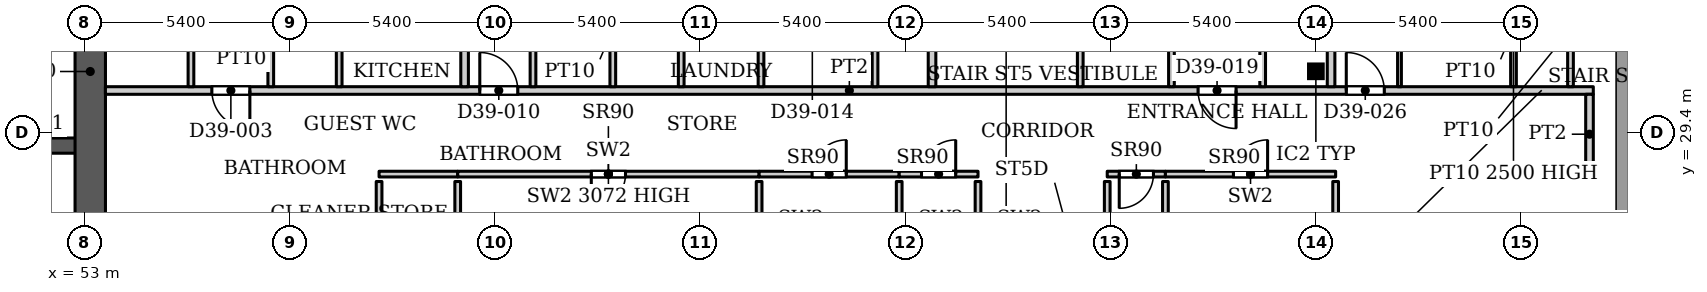
"""IFC4 building model, lengths in metres.
Left out: names, types, materials, properties, quantities, classifications, styles, units other than length and angle.
Written with IfcOpenShell. Run it as: python <this file> out.ifc"""

import sys

from ifc_helpers import new_model, si_unit, direction, frame, frame_2d, origin, origin_2d, place, context, subcontext, project, spatial, rectangle, hollow_rectangle, extrude, source, transform, mapped, element, fill, save


model = new_model("IFC4")
c1 = context("Model", 3, precision=1e-05, world=origin(), true_north=direction((0.0, 1.0)))
c2 = subcontext(c1, "Body", "Model", "MODEL_VIEW")
j1 = project(units=[si_unit("LENGTHUNIT", "METRE"), si_unit("PLANEANGLEUNIT", "RADIAN")], contexts=[c1])
p1 = place(None, origin())
s1 = spatial("IfcSite", under=j1, at=p1, CompositionType="ELEMENT")
p2 = place(p1, origin())
s2 = spatial("IfcBuilding", under=s1, at=p2, CompositionType="ELEMENT")
p3 = place(p2, frame((0.0, 0.0, 168.2)))
s3 = spatial("IfcBuildingStorey", under=s2, at=p3, CompositionType="ELEMENT", Elevation=168.2)
p4 = place(p3, frame((85.4, 31.005, 0.0), z_axis=(0.0, 0.0, 1.0), x_axis=(1.0, 0.0, 0.0)))
e1 = element("IfcColumn", 1, at=p4, inside=s3, PredefinedType="COLUMN", context=c2, shape_type="SweptSolid", body=[
    extrude(hollow_rectangle(XDim=0.305, YDim=0.305, WallThickness=0.016, InnerFilletRadius=0.016, OuterFilletRadius=0.032, at=origin_2d()), origin(), (0.0, 0.0, 1.0), 3.9),
])
p5 = place(p3, frame((34.75, 29.05, 0.0), z_axis=(0.0, 0.0, 1.0), x_axis=(1.0, 0.0, 0.0)))
e2 = element("IfcWall", 2, at=p5, inside=s3, PredefinedType="SHEAR", context=c2, shape_type="SweptSolid", body=[
    extrude(rectangle(XDim=18.4, YDim=0.4, at=frame_2d((9.2, 0.0))), origin(), (0.0, 0.0, 1.0), 3.9),
])
p6 = place(p5, frame((0.875, 0.0, 0.0)))
e3 = element("IfcOpeningElement", 3, at=p6, cuts=e2, PredefinedType="OPENING", context=c2, shape_type="SweptSolid", body=[
    extrude(rectangle(XDim=1.1, YDim=2.2, at=frame_2d((0.55, 1.1))), frame((0.0, 0.21, 0.0), z_axis=(0.0, -1.0, 0.0), x_axis=(1.0, 0.0, 0.0)), (0.0, 0.0, 1.0), 0.42),
])
p7 = place(p5, frame((3.725, 0.0, 0.0)))
e4 = element("IfcOpeningElement", 4, at=p7, cuts=e2, PredefinedType="OPENING", context=c2, shape_type="SweptSolid", body=[
    extrude(rectangle(XDim=1.1, YDim=2.2, at=frame_2d((0.55, 1.1))), frame((0.0, 0.21, 0.0), z_axis=(0.0, -1.0, 0.0), x_axis=(1.0, 0.0, 0.0)), (0.0, 0.0, 1.0), 0.42),
])
p8 = place(p5, frame((6.575, 0.0, 0.0)))
e5 = element("IfcOpeningElement", 5, at=p8, cuts=e2, PredefinedType="OPENING", context=c2, shape_type="SweptSolid", body=[
    extrude(rectangle(XDim=1.1, YDim=2.2, at=frame_2d((0.55, 1.1))), frame((0.0, 0.21, 0.0), z_axis=(0.0, -1.0, 0.0), x_axis=(1.0, 0.0, 0.0)), (0.0, 0.0, 1.0), 0.42),
])
p9 = place(p5, frame((9.425, 0.0, 0.0)))
e6 = element("IfcOpeningElement", 6, at=p9, cuts=e2, PredefinedType="OPENING", context=c2, shape_type="SweptSolid", body=[
    extrude(rectangle(XDim=1.1, YDim=2.2, at=frame_2d((0.55, 1.1))), frame((0.0, 0.21, 0.0), z_axis=(0.0, -1.0, 0.0), x_axis=(1.0, 0.0, 0.0)), (0.0, 0.0, 1.0), 0.42),
])
p10 = place(p5, frame((12.275, 0.0, 0.0)))
e7 = element("IfcOpeningElement", 7, at=p10, cuts=e2, PredefinedType="OPENING", context=c2, shape_type="SweptSolid", body=[
    extrude(rectangle(XDim=1.1, YDim=2.2, at=frame_2d((0.55, 1.1))), frame((0.0, 0.21, 0.0), z_axis=(0.0, -1.0, 0.0), x_axis=(1.0, 0.0, 0.0)), (0.0, 0.0, 1.0), 0.42),
])
p11 = place(p5, frame((15.125, 0.0, 0.0)))
e8 = element("IfcOpeningElement", 8, at=p11, cuts=e2, PredefinedType="OPENING", context=c2, shape_type="SweptSolid", body=[
    extrude(rectangle(XDim=1.1, YDim=2.2, at=frame_2d((0.55, 1.1))), frame((0.0, 0.21, 0.0), z_axis=(0.0, -1.0, 0.0), x_axis=(1.0, 0.0, 0.0)), (0.0, 0.0, 1.0), 0.42),
])
p12 = place(p3, frame((53.15, 25.8, 0.0), z_axis=(0.0, 0.0, 1.0), x_axis=(0.0, 1.0, 0.0)))
e9 = element("IfcWall", 9, at=p12, inside=s3, PredefinedType="SHEAR", context=c2, shape_type="SweptSolid", body=[
    extrude(rectangle(XDim=10.4, YDim=0.8, at=frame_2d((5.2, 0.0))), origin(), (0.0, 0.0, 1.0), 3.9),
])
p13 = place(p3, frame((60.75, 28.3, 0.0), z_axis=(0.0, 0.0, 1.0), x_axis=(1.0, 0.0, 0.0)))
e10 = element("IfcWall", 10, at=p13, inside=s3, PredefinedType="PARTITIONING", context=c2, shape_type="SweptSolid", body=[
    extrude(rectangle(XDim=2.069, YDim=0.15, at=frame_2d((1.035, 0.0))), origin(), (0.0, 0.0, 1.0), 3.9),
])
p14 = place(p3, frame((60.75, 23.075, 0.0), z_axis=(0.0, 0.0, 1.0), x_axis=(0.0, 1.0, 0.0)))
e11 = element("IfcWall", 11, at=p14, inside=s3, PredefinedType="PARTITIONING", context=c2, shape_type="SweptSolid", body=[
    extrude(rectangle(XDim=5.03, YDim=0.15, at=frame_2d((2.515, 0.0))), origin(), (0.0, 0.0, 1.0), 3.9),
])
p15 = place(p14, frame((2.387, 0.0, 0.0)))
e12 = element("IfcOpeningElement", 12, at=p15, cuts=e11, PredefinedType="OPENING", context=c2, shape_type="SweptSolid", body=[
    extrude(rectangle(XDim=0.9, YDim=2.2, at=frame_2d((0.45, 1.1))), frame((0.0, 0.085, 0.0), z_axis=(0.0, -1.0, 0.0), x_axis=(1.0, 0.0, 0.0)), (0.0, 0.0, 1.0), 0.17),
])
p16 = place(p3, frame((62.819, 22.966, 0.0), z_axis=(0.0, 0.0, 1.0), x_axis=(0.0, 1.0, 0.0)))
e13 = element("IfcWall", 13, at=p16, inside=s3, PredefinedType="PARTITIONING", context=c2, shape_type="SweptSolid", body=[
    extrude(rectangle(XDim=5.139, YDim=0.15, at=frame_2d((2.569, 0.0))), origin(), (0.0, 0.0, 1.0), 3.9),
])
p17 = place(p3, frame((62.819, 28.3, 0.0), z_axis=(0.0, 0.0, 1.0), x_axis=(1.0, 0.0, 0.0)))
e14 = element("IfcWall", 14, at=p17, inside=s3, PredefinedType="PARTITIONING", context=c2, shape_type="SweptSolid", body=[
    extrude(rectangle(XDim=7.931, YDim=0.15, at=frame_2d((3.965, 0.0))), origin(), (0.0, 0.0, 1.0), 3.072),
])
p18 = place(p17, frame((3.515, 0.0, 0.0)))
e15 = element("IfcOpeningElement", 15, at=p18, cuts=e14, PredefinedType="OPENING", context=c2, shape_type="SweptSolid", body=[
    extrude(rectangle(XDim=0.9, YDim=2.2, at=frame_2d((0.45, 1.1))), frame((0.0, 0.085, 0.0), z_axis=(0.0, -1.0, 0.0), x_axis=(1.0, 0.0, 0.0)), (0.0, 0.0, 1.0), 0.17),
])
p19 = place(p3, frame((70.75, 26.12, 0.0), z_axis=(0.0, 0.0, 1.0), x_axis=(0.0, 1.0, 0.0)))
e16 = element("IfcWall", 16, at=p19, inside=s3, PredefinedType="PARTITIONING", context=c2, shape_type="SweptSolid", body=[
    extrude(rectangle(XDim=1.985, YDim=0.15, at=frame_2d((0.992, 0.0))), origin(), (0.0, 0.0, 1.0), 3.9),
])
p20 = place(p3, frame((70.75, 28.3, 0.0), z_axis=(0.0, 0.0, 1.0), x_axis=(1.0, 0.0, 0.0)))
e17 = element("IfcWall", 17, at=p20, inside=s3, PredefinedType="PARTITIONING", context=c2, shape_type="SweptSolid", body=[
    extrude(rectangle(XDim=3.686, YDim=0.15, at=frame_2d((1.843, 0.0))), origin(), (0.0, 0.0, 1.0), 3.9),
])
p21 = place(p20, frame((1.393, 0.0, 0.0)))
e18 = element("IfcOpeningElement", 18, at=p21, cuts=e17, PredefinedType="OPENING", context=c2, shape_type="SweptSolid", body=[
    extrude(rectangle(XDim=0.9, YDim=2.2, at=frame_2d((0.45, 1.1))), frame((0.0, 0.085, 0.0), z_axis=(0.0, -1.0, 0.0), x_axis=(1.0, 0.0, 0.0)), (0.0, 0.0, 1.0), 0.17),
])
p22 = place(p3, frame((74.436, 26.12, 0.0), z_axis=(0.0, 0.0, 1.0), x_axis=(0.0, 1.0, 0.0)))
e19 = element("IfcWall", 19, at=p22, inside=s3, PredefinedType="PARTITIONING", context=c2, shape_type="SweptSolid", body=[
    extrude(rectangle(XDim=1.985, YDim=0.15, at=frame_2d((0.992, 0.0))), origin(), (0.0, 0.0, 1.0), 3.9),
])
p23 = place(p3, frame((74.436, 28.3, 0.0), z_axis=(0.0, 0.0, 1.0), x_axis=(1.0, 0.0, 0.0)))
e20 = element("IfcWall", 20, at=p23, inside=s3, PredefinedType="PARTITIONING", context=c2, shape_type="SweptSolid", body=[
    extrude(rectangle(XDim=2.074, YDim=0.15, at=frame_2d((1.037, 0.0))), origin(), (0.0, 0.0, 1.0), 3.9),
])
p24 = place(p23, frame((0.587, 0.0, 0.0)))
e21 = element("IfcOpeningElement", 21, at=p24, cuts=e20, PredefinedType="OPENING", context=c2, shape_type="SweptSolid", body=[
    extrude(rectangle(XDim=0.9, YDim=2.2, at=frame_2d((0.45, 1.1))), frame((0.0, 0.085, 0.0), z_axis=(0.0, -1.0, 0.0), x_axis=(1.0, 0.0, 0.0)), (0.0, 0.0, 1.0), 0.17),
])
p25 = place(p3, frame((76.51, 26.12, 0.0), z_axis=(0.0, 0.0, 1.0), x_axis=(0.0, 1.0, 0.0)))
e22 = element("IfcWall", 22, at=p25, inside=s3, PredefinedType="PARTITIONING", context=c2, shape_type="SweptSolid", body=[
    extrude(rectangle(XDim=1.985, YDim=0.15, at=frame_2d((0.992, 0.0))), origin(), (0.0, 0.0, 1.0), 3.9),
])
p26 = place(p3, frame((79.91, 28.3, 0.0), z_axis=(0.0, 0.0, 1.0), x_axis=(1.0, 0.0, 0.0)))
e23 = element("IfcWall", 23, at=p26, inside=s3, PredefinedType="PARTITIONING", context=c2, shape_type="SweptSolid", body=[
    extrude(rectangle(XDim=1.531, YDim=0.15, at=frame_2d((0.766, 0.0))), origin(), (0.0, 0.0, 1.0), 3.9),
])
p27 = place(p26, frame((0.316, 0.0, 0.0)))
e24 = element("IfcOpeningElement", 24, at=p27, cuts=e23, PredefinedType="OPENING", context=c2, shape_type="SweptSolid", body=[
    extrude(rectangle(XDim=0.9, YDim=2.2, at=frame_2d((0.45, 1.1))), frame((0.0, 0.085, 0.0), z_axis=(0.0, -1.0, 0.0), x_axis=(1.0, 0.0, 0.0)), (0.0, 0.0, 1.0), 0.17),
])
p28 = place(p3, frame((79.91, 26.12, 0.0), z_axis=(0.0, 0.0, 1.0), x_axis=(0.0, 1.0, 0.0)))
e25 = element("IfcWall", 25, at=p28, inside=s3, PredefinedType="PARTITIONING", context=c2, shape_type="SweptSolid", body=[
    extrude(rectangle(XDim=1.985, YDim=0.15, at=frame_2d((0.992, 0.0))), origin(), (0.0, 0.0, 1.0), 3.9),
])
p29 = place(p3, frame((81.441, 25.62, 0.0), z_axis=(0.0, 0.0, 1.0), x_axis=(0.0, 1.0, 0.0)))
e26 = element("IfcWall", 26, at=p29, inside=s3, PredefinedType="PARTITIONING", context=c2, shape_type="SweptSolid", body=[
    extrude(rectangle(XDim=2.485, YDim=0.15, at=frame_2d((1.242, 0.0))), origin(), (0.0, 0.0, 1.0), 3.9),
])
p30 = place(p3, frame((81.441, 28.3, 0.0), z_axis=(0.0, 0.0, 1.0), x_axis=(1.0, 0.0, 0.0)))
e27 = element("IfcWall", 27, at=p30, inside=s3, PredefinedType="PARTITIONING", context=c2, shape_type="SweptSolid", body=[
    extrude(rectangle(XDim=4.479, YDim=0.15, at=frame_2d((2.24, 0.0))), origin(), (0.0, 0.0, 1.0), 3.9),
])
p31 = place(p30, frame((1.789, 0.0, 0.0)))
e28 = element("IfcOpeningElement", 28, at=p31, cuts=e27, PredefinedType="OPENING", context=c2, shape_type="SweptSolid", body=[
    extrude(rectangle(XDim=0.9, YDim=2.2, at=frame_2d((0.45, 1.1))), frame((0.0, 0.085, 0.0), z_axis=(0.0, -1.0, 0.0), x_axis=(1.0, 0.0, 0.0)), (0.0, 0.0, 1.0), 0.17),
])
p32 = place(p3, frame((85.92, 25.62, 0.0), z_axis=(0.0, 0.0, 1.0), x_axis=(0.0, 1.0, 0.0)))
e29 = element("IfcWall", 29, at=p32, inside=s3, PredefinedType="PARTITIONING", context=c2, shape_type="SweptSolid", body=[
    extrude(rectangle(XDim=2.485, YDim=0.15, at=frame_2d((1.242, 0.0))), origin(), (0.0, 0.0, 1.0), 3.9),
])
p33 = place(p3, frame((53.549, 30.5, 0.0), z_axis=(0.0, 0.0, 1.0), x_axis=(1.0, 0.0, 0.0)))
e30 = element("IfcWall", 30, at=p33, inside=s3, PredefinedType="PARTITIONING", context=c2, shape_type="SweptSolid", body=[
    extrude(rectangle(XDim=39.151, YDim=0.2, at=frame_2d((19.575, 0.0))), origin(), (0.0, 0.0, 1.0), 3.6),
])
p34 = place(p33, frame((2.801, 0.0, 0.0)))
e31 = element("IfcOpeningElement", 31, at=p34, cuts=e30, PredefinedType="OPENING", context=c2, shape_type="SweptSolid", body=[
    extrude(rectangle(XDim=1.0, YDim=2.1, at=frame_2d((0.5, 1.05))), frame((0.0, 0.11, 0.0), z_axis=(0.0, -1.0, 0.0), x_axis=(1.0, 0.0, 0.0)), (0.0, 0.0, 1.0), 0.22),
])
p35 = place(p33, frame((9.851, 0.0, 0.0)))
e32 = element("IfcOpeningElement", 32, at=p35, cuts=e30, PredefinedType="OPENING", context=c2, shape_type="SweptSolid", body=[
    extrude(rectangle(XDim=1.0, YDim=2.1, at=frame_2d((0.5, 1.05))), frame((0.0, 0.11, 0.0), z_axis=(0.0, -1.0, 0.0), x_axis=(1.0, 0.0, 0.0)), (0.0, 0.0, 1.0), 0.22),
])
p36 = place(p33, frame((28.751, 0.0, 0.0)))
e33 = element("IfcOpeningElement", 33, at=p36, cuts=e30, PredefinedType="OPENING", context=c2, shape_type="SweptSolid", body=[
    extrude(rectangle(XDim=1.0, YDim=2.1, at=frame_2d((0.5, 1.05))), frame((0.0, 0.11, 0.0), z_axis=(0.0, -1.0, 0.0), x_axis=(1.0, 0.0, 0.0)), (0.0, 0.0, 1.0), 0.22),
])
p37 = place(p33, frame((32.651, 0.0, 0.0)))
e34 = element("IfcOpeningElement", 34, at=p37, cuts=e30, PredefinedType="OPENING", context=c2, shape_type="SweptSolid", body=[
    extrude(rectangle(XDim=1.0, YDim=2.1, at=frame_2d((0.5, 1.05))), frame((0.0, 0.11, 0.0), z_axis=(0.0, -1.0, 0.0), x_axis=(1.0, 0.0, 0.0)), (0.0, 0.0, 1.0), 0.22),
])
p38 = place(p3, frame((55.8, 30.6, 0.0), z_axis=(0.0, 0.0, 1.0), x_axis=(0.0, 1.0, 0.0)))
e35 = element("IfcWall", 35, at=p38, inside=s3, PredefinedType="PARTITIONING", context=c2, shape_type="SweptSolid", body=[
    extrude(rectangle(XDim=3.175, YDim=0.15, at=frame_2d((1.587, 0.0))), origin(), (0.0, 0.0, 1.0), 3.6),
])
for number, where, z_axis, x_axis in (
    (36, (57.9, 30.6, 0.0), (0.0, 0.0, 1.0), (0.0, 1.0, 0.0)),
    (37, (59.7, 30.6, 0.0), (0.0, 0.0, 1.0), (0.0, 1.0, 0.0)),
):
    element("IfcWall", number, at=place(p3, frame(where, z_axis=z_axis, x_axis=x_axis)), inside=s3, PredefinedType="PARTITIONING", context=c2, shape_type="SweptSolid", body=[
        extrude(rectangle(XDim=3.025, YDim=0.15, at=frame_2d((1.512, 0.0))), origin(), (0.0, 0.0, 1.0), 3.6),
    ])
p39 = place(p3, frame((63.0, 30.6, 0.0), z_axis=(0.0, 0.0, 1.0), x_axis=(0.0, 1.0, 0.0)))
e38 = element("IfcWall", 38, at=p39, inside=s3, PredefinedType="PARTITIONING", context=c2, shape_type="SweptSolid", body=[
    extrude(rectangle(XDim=13.3, YDim=0.2, at=frame_2d((6.65, 0.0))), origin(), (0.0, 0.0, 1.0), 3.6),
])
for number, where, z_axis, x_axis in (
    (39, (64.8, 30.6, 0.0), (0.0, 0.0, 1.0), (0.0, 1.0, 0.0)),
    (40, (66.9, 30.6, 0.0), (0.0, 0.0, 1.0), (0.0, 1.0, 0.0)),
    (41, (68.7, 30.6, 0.0), (0.0, 0.0, 1.0), (0.0, 1.0, 0.0)),
    (42, (70.8, 30.6, 0.0), (0.0, 0.0, 1.0), (0.0, 1.0, 0.0)),
    (43, (73.8, 30.6, 0.0), (0.0, 0.0, 1.0), (0.0, 1.0, 0.0)),
):
    element("IfcWall", number, at=place(p3, frame(where, z_axis=z_axis, x_axis=x_axis)), inside=s3, PredefinedType="PARTITIONING", context=c2, shape_type="SweptSolid", body=[
        extrude(rectangle(XDim=3.025, YDim=0.15, at=frame_2d((1.512, 0.0))), origin(), (0.0, 0.0, 1.0), 3.6),
    ])
p40 = place(p3, frame((75.3, 30.6, 0.0), z_axis=(0.0, 0.0, 1.0), x_axis=(0.0, 1.0, 0.0)))
e44 = element("IfcWall", 44, at=p40, inside=s3, PredefinedType="PARTITIONING", context=c2, shape_type="SweptSolid", body=[
    extrude(rectangle(XDim=13.3, YDim=0.2, at=frame_2d((6.65, 0.0))), origin(), (0.0, 0.0, 1.0), 3.6),
])
for number, where, z_axis, x_axis in (
    (45, (79.2, 30.6, 0.0), (0.0, 0.0, 1.0), (0.0, 1.0, 0.0)),
    (46, (81.6, 30.6, 0.0), (0.0, 0.0, 1.0), (0.0, 1.0, 0.0)),
):
    element("IfcWall", number, at=place(p3, frame(where, z_axis=z_axis, x_axis=x_axis)), inside=s3, PredefinedType="PARTITIONING", context=c2, shape_type="SweptSolid", body=[
        extrude(rectangle(XDim=3.025, YDim=0.15, at=frame_2d((1.512, 0.0))), origin(), (0.0, 0.0, 1.0), 3.6),
    ])
p41 = place(p3, frame((84.0, 30.6, 0.0), z_axis=(0.0, 0.0, 1.0), x_axis=(0.0, 1.0, 0.0)))
e47 = element("IfcWall", 47, at=p41, inside=s3, PredefinedType="PARTITIONING", context=c2, shape_type="SweptSolid", body=[
    extrude(rectangle(XDim=3.175, YDim=0.15, at=frame_2d((1.587, 0.0))), origin(), (0.0, 0.0, 1.0), 3.6),
])
p42 = place(p3, frame((85.8, 30.6, 0.0), z_axis=(0.0, 0.0, 1.0), x_axis=(0.0, 1.0, 0.0)))
e48 = element("IfcWall", 48, at=p42, inside=s3, PredefinedType="PARTITIONING", context=c2, shape_type="SweptSolid", body=[
    extrude(rectangle(XDim=13.3, YDim=0.2, at=frame_2d((6.65, 0.0))), origin(), (0.0, 0.0, 1.0), 3.6),
])
p43 = place(p3, frame((87.6, 30.6, 0.0), z_axis=(0.0, 0.0, 1.0), x_axis=(0.0, 1.0, 0.0)))
e49 = element("IfcWall", 49, at=p43, inside=s3, PredefinedType="PARTITIONING", context=c2, shape_type="SweptSolid", body=[
    extrude(rectangle(XDim=3.025, YDim=0.1, at=frame_2d((1.512, 0.0))), origin(), (0.0, 0.0, 1.0), 3.6),
])
p44 = place(p3, frame((90.6, 30.6, 0.0), z_axis=(0.0, 0.0, 1.0), x_axis=(0.0, 1.0, 0.0)))
e50 = element("IfcWall", 50, at=p44, inside=s3, PredefinedType="PARTITIONING", context=c2, shape_type="SweptSolid", body=[
    extrude(rectangle(XDim=3.025, YDim=0.15, at=frame_2d((1.512, 0.0))), origin(), (0.0, 0.0, 1.0), 2.5),
])
p45 = place(p3, frame((92.1, 30.6, 0.0), z_axis=(0.0, 0.0, 1.0), x_axis=(0.0, 1.0, 0.0)))
e51 = element("IfcWall", 51, at=p45, inside=s3, PredefinedType="PARTITIONING", context=c2, shape_type="SweptSolid", body=[
    extrude(rectangle(XDim=3.025, YDim=0.15, at=frame_2d((1.512, 0.0))), origin(), (0.0, 0.0, 1.0), 3.6),
])
p46 = place(p3, frame((92.6, 28.3, 0.0), z_axis=(0.0, 0.0, 1.0), x_axis=(0.0, 1.0, 0.0)))
e52 = element("IfcWall", 52, at=p46, inside=s3, PredefinedType="PARTITIONING", context=c2, shape_type="SweptSolid", body=[
    extrude(rectangle(XDim=2.1, YDim=0.2, at=frame_2d((1.05, 0.0))), origin(), (0.0, 0.0, 1.0), 3.6),
])
m1 = source(origin(), c2, "Body", "SweptSolid", [
    extrude(rectangle(XDim=0.9, YDim=2.2, at=frame_2d((0.45, 1.1))), frame((0.0, 0.025, 0.0), z_axis=(0.0, -1.0, 0.0), x_axis=(1.0, 0.0, 0.0)), (0.0, 0.0, 1.0), 0.05),
])
p47 = place(p18, origin())
e53 = element("IfcDoor", 53, at=p47, inside=s3, OperationType="SINGLE_SWING_RIGHT", PredefinedType="DOOR", context=c2, shape_type="MappedRepresentation", body=[
    mapped(m1, transform((0.0, 0.0, 0.0), x_axis=(1.0, 0.0, 0.0), y_axis=(0.0, 1.0, 0.0), z_axis=(0.0, 0.0, 1.0), scale=1.0)),
])
fill(e15, e53)
p48 = place(p21, origin())
e54 = element("IfcDoor", 54, at=p48, inside=s3, OperationType="SINGLE_SWING_LEFT", PredefinedType="DOOR", context=c2, shape_type="MappedRepresentation", body=[
    mapped(m1, transform((0.0, 0.0, 0.0), x_axis=(1.0, 0.0, 0.0), y_axis=(0.0, 1.0, 0.0), z_axis=(0.0, 0.0, 1.0), scale=1.0)),
])
fill(e18, e54)
p49 = place(p24, origin())
e55 = element("IfcDoor", 55, at=p49, inside=s3, OperationType="SINGLE_SWING_LEFT", PredefinedType="DOOR", context=c2, shape_type="MappedRepresentation", body=[
    mapped(m1, transform((0.0, 0.0, 0.0), x_axis=(1.0, 0.0, 0.0), y_axis=(0.0, 1.0, 0.0), z_axis=(0.0, 0.0, 1.0), scale=1.0)),
])
fill(e21, e55)
p50 = place(p27, origin())
e56 = element("IfcDoor", 56, at=p50, inside=s3, OperationType="SINGLE_SWING_RIGHT", PredefinedType="DOOR", context=c2, shape_type="MappedRepresentation", body=[
    mapped(m1, transform((0.0, 0.0, 0.0), x_axis=(1.0, 0.0, 0.0), y_axis=(0.0, 1.0, 0.0), z_axis=(0.0, 0.0, 1.0), scale=1.0)),
])
fill(e24, e56)
p51 = place(p31, origin())
e57 = element("IfcDoor", 57, at=p51, inside=s3, OperationType="SINGLE_SWING_LEFT", PredefinedType="DOOR", context=c2, shape_type="MappedRepresentation", body=[
    mapped(m1, transform((0.0, 0.0, 0.0), x_axis=(1.0, 0.0, 0.0), y_axis=(0.0, 1.0, 0.0), z_axis=(0.0, 0.0, 1.0), scale=1.0)),
])
fill(e28, e57)
m2 = source(origin(), c2, "Body", "SweptSolid", [
    extrude(rectangle(XDim=1.0, YDim=2.1, at=frame_2d((0.5, 1.05))), frame((0.0, 0.025, 0.0), z_axis=(0.0, -1.0, 0.0), x_axis=(1.0, 0.0, 0.0)), (0.0, 0.0, 1.0), 0.05),
])
p52 = place(p34, origin())
e58 = element("IfcDoor", 58, at=p52, inside=s3, OperationType="SINGLE_SWING_RIGHT", PredefinedType="DOOR", context=c2, shape_type="MappedRepresentation", body=[
    mapped(m2, transform((0.0, 0.0, 0.0), x_axis=(1.0, 0.0, 0.0), y_axis=(0.0, 1.0, 0.0), z_axis=(0.0, 0.0, 1.0), scale=1.0)),
])
fill(e31, e58)
p53 = place(p35, origin())
e59 = element("IfcDoor", 59, at=p53, inside=s3, OperationType="SINGLE_SWING_LEFT", PredefinedType="DOOR", context=c2, shape_type="MappedRepresentation", body=[
    mapped(m2, transform((0.0, 0.0, 0.0), x_axis=(1.0, 0.0, 0.0), y_axis=(0.0, 1.0, 0.0), z_axis=(0.0, 0.0, 1.0), scale=1.0)),
])
fill(e32, e59)
p54 = place(p36, origin())
e60 = element("IfcDoor", 60, at=p54, inside=s3, OperationType="SINGLE_SWING_RIGHT", PredefinedType="DOOR", context=c2, shape_type="MappedRepresentation", body=[
    mapped(m2, transform((0.0, 0.0, 0.0), x_axis=(1.0, 0.0, 0.0), y_axis=(0.0, 1.0, 0.0), z_axis=(0.0, 0.0, 1.0), scale=1.0)),
])
fill(e33, e60)
p55 = place(p37, origin())
e61 = element("IfcDoor", 61, at=p55, inside=s3, OperationType="SINGLE_SWING_LEFT", PredefinedType="DOOR", context=c2, shape_type="MappedRepresentation", body=[
    mapped(m2, transform((0.0, 0.0, 0.0), x_axis=(1.0, 0.0, 0.0), y_axis=(0.0, 1.0, 0.0), z_axis=(0.0, 0.0, 1.0), scale=1.0)),
])
fill(e34, e61)
save(model, sys.argv[1])
